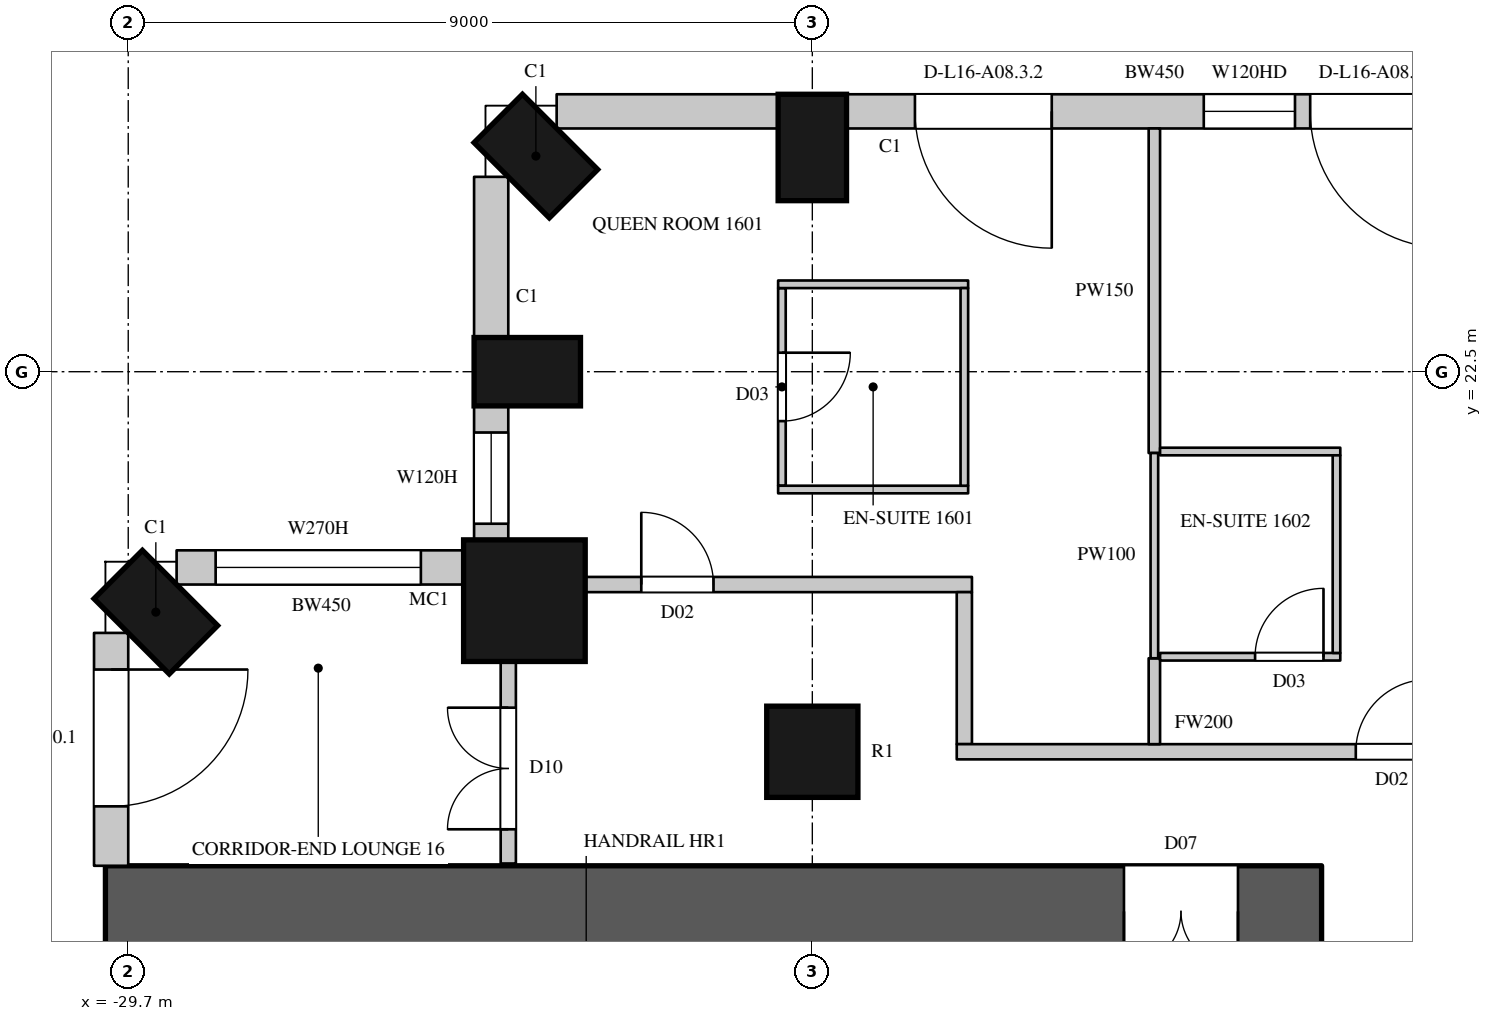
"""IFC4 building model, lengths in metres.
Left out: names, types, materials, properties, quantities, classifications, styles, units other than length and angle.
Written with IfcOpenShell. Run it as: python <this file> out.ifc"""

import sys

from ifc_helpers import new_model, si_unit, direction, frame, frame_2d, origin, origin_2d, place, context, subcontext, project, spatial, rectangle, circle, extrude, element, fill, save


model = new_model("IFC4")
c1 = context("Model", 3, precision=1e-05, world=origin(), true_north=direction((0.0, 1.0)))
c2 = subcontext(c1, "Body", "Model", "MODEL_VIEW")
j1 = project(units=[si_unit("LENGTHUNIT", "METRE"), si_unit("PLANEANGLEUNIT", "RADIAN")], contexts=[c1])
p1 = place(None, origin())
s1 = spatial("IfcSite", under=j1, at=p1, CompositionType="ELEMENT")
p2 = place(p1, origin())
s2 = spatial("IfcBuilding", under=s1, at=p2, CompositionType="ELEMENT")
p3 = place(p2, frame((0.0, 0.0, 87.9)))
s3 = spatial("IfcBuildingStorey", under=s2, at=p3, CompositionType="ELEMENT", Elevation=87.9)
for number, where, z_axis, x_axis in (
    (1, (-29.337, 19.337, 0.0), (0.0, 0.0, 1.0), (-0.707, -0.707, 0.0)),
    (2, (-20.7, 25.45, 0.0), (0.0, 0.0, 1.0), (-1.0, 0.0, 0.0)),
    (3, (-24.337, 25.337, 0.0), (0.0, 0.0, 1.0), (-0.707, -0.707, 0.0)),
    (4, (-24.45, 22.5, 0.0), (0.0, 0.0, 1.0), (0.0, -1.0, 0.0)),
):
    element("IfcColumn", number, at=place(p3, frame(where, z_axis=z_axis, x_axis=x_axis)), inside=s3, PredefinedType="COLUMN", context=c2, shape_type="SweptSolid", body=[
        extrude(rectangle(XDim=0.9, YDim=1.4, at=origin_2d()), origin(), (0.0, 0.0, 1.0), 3.6),
    ])
p4 = place(p3, frame((-24.488, 19.488, 0.0), z_axis=(0.0, 0.0, 1.0), x_axis=(1.0, 0.0, 0.0)))
e5 = element("IfcColumn", 5, at=p4, inside=s3, PredefinedType="COLUMN", context=c2, shape_type="SweptSolid", body=[
    extrude(circle(Radius=0.8, at=origin_2d()), origin(), (0.0, 0.0, 1.0), 3.6),
])
p5 = place(p3, frame((-20.7, 17.5, 0.0), z_axis=(0.0, 0.0, 1.0), x_axis=(1.0, 0.0, 0.0)))
e6 = element("IfcColumn", 6, at=p5, inside=s3, PredefinedType="COLUMN", context=c2, shape_type="SweptSolid", body=[
    extrude(circle(Radius=0.6, at=origin_2d()), origin(), (0.0, 0.0, 1.0), 3.6),
])
p6 = place(p3, frame((-29.925, 19.064, 0.0), z_axis=(0.0, 0.0, 1.0), x_axis=(0.0, -1.0, 0.0)))
e7 = element("IfcWall", 7, at=p6, inside=s3, PredefinedType="SOLIDWALL", context=c2, shape_type="SweptSolid", body=[
    extrude(rectangle(XDim=3.064, YDim=0.45, at=frame_2d((1.532, 0.0))), origin(), (0.0, 0.0, 1.0), 3.3),
])
p7 = place(p6, frame((0.482, 0.0, 0.0)))
e8 = element("IfcOpeningElement", 8, at=p7, cuts=e7, PredefinedType="OPENING", context=c2, shape_type="SweptSolid", body=[
    extrude(rectangle(XDim=1.8, YDim=2.4, at=frame_2d((0.9, 1.2))), frame((0.0, 0.235, 0.0), z_axis=(0.0, -1.0, 0.0), x_axis=(1.0, 0.0, 0.0)), (0.0, 0.0, 1.0), 0.47),
])
p8 = place(p3, frame((-12.15, 25.925, 0.0), z_axis=(0.0, 0.0, 1.0), x_axis=(-1.0, 0.0, 0.0)))
e9 = element("IfcWall", 9, at=p8, inside=s3, PredefinedType="SOLIDWALL", context=c2, shape_type="SweptSolid", body=[
    extrude(rectangle(XDim=8.1, YDim=0.45, at=frame_2d((4.05, 0.0))), origin(), (0.0, 0.0, 1.0), 3.3),
])
p9 = place(p8, frame((0.2, 0.0, 0.0)))
e10 = element("IfcOpeningElement", 10, at=p9, cuts=e9, PredefinedType="OPENING", context=c2, shape_type="SweptSolid", body=[
    extrude(rectangle(XDim=1.8, YDim=2.4, at=frame_2d((0.9, 1.2))), frame((0.0, 0.235, 0.0), z_axis=(0.0, -1.0, 0.0), x_axis=(1.0, 0.0, 0.0)), (0.0, 0.0, 1.0), 0.47),
])
p10 = place(p8, frame((2.2, 0.0, 1.05)))
e11 = element("IfcOpeningElement", 11, at=p10, cuts=e9, PredefinedType="OPENING", context=c2, shape_type="SweptSolid", body=[
    extrude(rectangle(XDim=1.2, YDim=2.0, at=frame_2d((0.6, 1.0))), frame((0.0, 0.235, 0.0), z_axis=(0.0, -1.0, 0.0), x_axis=(1.0, 0.0, 0.0)), (0.0, 0.0, 1.0), 0.47),
])
p11 = place(p8, frame((5.4, 0.0, 0.0)))
e12 = element("IfcOpeningElement", 12, at=p11, cuts=e9, PredefinedType="OPENING", context=c2, shape_type="SweptSolid", body=[
    extrude(rectangle(XDim=1.8, YDim=2.4, at=frame_2d((0.9, 1.2))), frame((0.0, 0.235, 0.0), z_axis=(0.0, -1.0, 0.0), x_axis=(1.0, 0.0, 0.0)), (0.0, 0.0, 1.0), 0.47),
])
p12 = place(p3, frame((-21.15, 25.925, 0.0), z_axis=(0.0, 0.0, 1.0), x_axis=(-1.0, 0.0, 0.0)))
e13 = element("IfcWall", 13, at=p12, inside=s3, PredefinedType="SOLIDWALL", context=c2, shape_type="SweptSolid", body=[
    extrude(rectangle(XDim=2.914, YDim=0.45, at=frame_2d((1.457, 0.0))), origin(), (0.0, 0.0, 1.0), 3.3),
])
p13 = place(p3, frame((-24.925, 25.064, 0.0), z_axis=(0.0, 0.0, 1.0), x_axis=(0.0, -1.0, 0.0)))
e14 = element("IfcWall", 14, at=p13, inside=s3, PredefinedType="SOLIDWALL", context=c2, shape_type="SweptSolid", body=[
    extrude(rectangle(XDim=2.114, YDim=0.45, at=frame_2d((1.057, 0.0))), origin(), (0.0, 0.0, 1.0), 3.3),
])
p14 = place(p3, frame((-24.925, 22.05, 0.0), z_axis=(0.0, 0.0, 1.0), x_axis=(0.0, -1.0, 0.0)))
e15 = element("IfcWall", 15, at=p14, inside=s3, PredefinedType="SOLIDWALL", context=c2, shape_type="SweptSolid", body=[
    extrude(rectangle(XDim=1.792, YDim=0.45, at=frame_2d((0.896, 0.0))), origin(), (0.0, 0.0, 1.0), 3.3),
])
p15 = place(p14, frame((0.35, 0.0, 1.05)))
e16 = element("IfcOpeningElement", 16, at=p15, cuts=e15, PredefinedType="OPENING", context=c2, shape_type="SweptSolid", body=[
    extrude(rectangle(XDim=1.2, YDim=2.0, at=frame_2d((0.6, 1.0))), frame((0.0, 0.235, 0.0), z_axis=(0.0, -1.0, 0.0), x_axis=(1.0, 0.0, 0.0)), (0.0, 0.0, 1.0), 0.47),
])
p16 = place(p3, frame((-25.259, 19.925, 0.0), z_axis=(0.0, 0.0, 1.0), x_axis=(-1.0, 0.0, 0.0)))
e17 = element("IfcWall", 17, at=p16, inside=s3, PredefinedType="SOLIDWALL", context=c2, shape_type="SweptSolid", body=[
    extrude(rectangle(XDim=3.805, YDim=0.45, at=frame_2d((1.903, 0.0))), origin(), (0.0, 0.0, 1.0), 3.3),
])
p17 = place(p16, frame((0.592, 0.0, 1.05)))
e18 = element("IfcOpeningElement", 18, at=p17, cuts=e17, PredefinedType="OPENING", context=c2, shape_type="SweptSolid", body=[
    extrude(rectangle(XDim=2.7, YDim=2.0, at=frame_2d((1.35, 1.0))), frame((0.0, 0.235, 0.0), z_axis=(0.0, -1.0, 0.0), x_axis=(1.0, 0.0, 0.0)), (0.0, 0.0, 1.0), 0.47),
])
p18 = place(p3, frame((-30.0, 15.4, 0.0), z_axis=(0.0, 0.0, 1.0), x_axis=(1.0, 0.0, 0.0)))
e19 = element("IfcWall", 19, at=p18, inside=s3, PredefinedType="SHEAR", context=c2, shape_type="SweptSolid", body=[
    extrude(rectangle(XDim=16.0, YDim=1.2, at=frame_2d((8.0, 0.0))), origin(), (0.0, 0.0, 1.0), 3.6),
])
p19 = place(p18, frame((13.4, 0.0, 0.0)))
e20 = element("IfcOpeningElement", 20, at=p19, cuts=e19, PredefinedType="OPENING", context=c2, shape_type="SweptSolid", body=[
    extrude(rectangle(XDim=1.5, YDim=2.4, at=frame_2d((0.75, 1.2))), frame((0.0, 0.61, 0.0), z_axis=(0.0, -1.0, 0.0), x_axis=(1.0, 0.0, 0.0)), (0.0, 0.0, 1.0), 1.22),
])
p20 = place(p3, frame((-24.7, 16.03, 0.0), z_axis=(0.0, 0.0, 1.0), x_axis=(0.0, 1.0, 0.0)))
e21 = element("IfcWall", 21, at=p20, inside=s3, PredefinedType="PARTITIONING", context=c2, shape_type="SweptSolid", body=[
    extrude(rectangle(XDim=2.67, YDim=0.2, at=frame_2d((1.335, 0.0))), origin(), (0.0, 0.0, 1.0), 3.3),
])
p21 = place(p20, frame((0.45, 0.0, 0.0)))
e22 = element("IfcOpeningElement", 22, at=p21, cuts=e21, PredefinedType="OPENING", context=c2, shape_type="SweptSolid", body=[
    extrude(rectangle(XDim=1.6, YDim=2.4, at=frame_2d((0.8, 1.2))), frame((0.0, 0.11, 0.0), z_axis=(0.0, -1.0, 0.0), x_axis=(1.0, 0.0, 0.0)), (0.0, 0.0, 1.0), 0.22),
])
p22 = place(p3, frame((-23.7, 19.7, 0.0), z_axis=(0.0, 0.0, 1.0), x_axis=(1.0, 0.0, 0.0)))
e23 = element("IfcWall", 23, at=p22, inside=s3, PredefinedType="PARTITIONING", context=c2, shape_type="SweptSolid", body=[
    extrude(rectangle(XDim=5.1, YDim=0.2, at=frame_2d((2.55, 0.0))), origin(), (0.0, 0.0, 1.0), 3.3),
])
p23 = place(p22, frame((0.75, 0.0, 0.0)))
e24 = element("IfcOpeningElement", 24, at=p23, cuts=e23, PredefinedType="OPENING", context=c2, shape_type="SweptSolid", body=[
    extrude(rectangle(XDim=0.95, YDim=2.2, at=frame_2d((0.475, 1.1))), frame((0.0, 0.11, 0.0), z_axis=(0.0, -1.0, 0.0), x_axis=(1.0, 0.0, 0.0)), (0.0, 0.0, 1.0), 0.22),
])
p24 = place(p3, frame((-18.7, 17.6, 0.0), z_axis=(0.0, 0.0, 1.0), x_axis=(0.0, 1.0, 0.0)))
e25 = element("IfcWall", 25, at=p24, inside=s3, PredefinedType="PARTITIONING", context=c2, shape_type="SweptSolid", body=[
    extrude(rectangle(XDim=2.0, YDim=0.2, at=frame_2d((1.0, 0.0))), origin(), (0.0, 0.0, 1.0), 3.3),
])
p25 = place(p3, frame((-18.8, 17.5, 0.0), z_axis=(0.0, 0.0, 1.0), x_axis=(1.0, 0.0, 0.0)))
e26 = element("IfcWall", 26, at=p25, inside=s3, PredefinedType="PARTITIONING", context=c2, shape_type="SweptSolid", body=[
    extrude(rectangle(XDim=6.5, YDim=0.2, at=frame_2d((3.25, 0.0))), origin(), (0.0, 0.0, 1.0), 2.75),
])
p26 = place(p25, frame((5.25, 0.0, 0.0)))
e27 = element("IfcOpeningElement", 27, at=p26, cuts=e26, PredefinedType="OPENING", context=c2, shape_type="SweptSolid", body=[
    extrude(rectangle(XDim=0.95, YDim=2.2, at=frame_2d((0.475, 1.1))), frame((0.0, 0.11, 0.0), z_axis=(0.0, -1.0, 0.0), x_axis=(1.0, 0.0, 0.0)), (0.0, 0.0, 1.0), 0.22),
])
p27 = place(p3, frame((-16.2, 17.6, 0.0), z_axis=(0.0, 0.0, 1.0), x_axis=(0.0, 1.0, 0.0)))
e28 = element("IfcWall", 28, at=p27, inside=s3, PredefinedType="PARTITIONING", context=c2, shape_type="SweptSolid", body=[
    extrude(rectangle(XDim=1.13, YDim=0.15, at=frame_2d((0.565, 0.0))), origin(), (0.0, 0.0, 1.0), 2.65),
])
p28 = place(p3, frame((-16.2, 21.43, 0.0), z_axis=(0.0, 0.0, 1.0), x_axis=(0.0, 1.0, 0.0)))
e29 = element("IfcWall", 29, at=p28, inside=s3, PredefinedType="PARTITIONING", context=c2, shape_type="SweptSolid", body=[
    extrude(rectangle(XDim=4.27, YDim=0.15, at=frame_2d((2.135, 0.0))), origin(), (0.0, 0.0, 1.0), 2.65),
])
p29 = place(p3, frame((-21.1, 21.0, 0.0), z_axis=(0.0, 0.0, 1.0), x_axis=(0.0, 1.0, 0.0)))
e30 = element("IfcWall", 30, at=p29, inside=s3, PredefinedType="PARTITIONING", context=c2, shape_type="SweptSolid", body=[
    extrude(rectangle(XDim=2.6, YDim=0.1, at=frame_2d((1.3, 0.0))), origin(), (0.0, 0.0, 1.0), 3.3),
])
p30 = place(p29, frame((0.85, 0.0, 0.0)))
e31 = element("IfcOpeningElement", 31, at=p30, cuts=e30, PredefinedType="OPENING", context=c2, shape_type="SweptSolid", body=[
    extrude(rectangle(XDim=0.9, YDim=2.2, at=frame_2d((0.45, 1.1))), frame((0.0, 0.06, 0.0), z_axis=(0.0, -1.0, 0.0), x_axis=(1.0, 0.0, 0.0)), (0.0, 0.0, 1.0), 0.12),
])
for number, where, z_axis, x_axis in (
    (32, (-21.15, 20.95, 0.0), (0.0, 0.0, 1.0), (1.0, 0.0, 0.0)),
    (33, (-21.15, 23.65, 0.0), (0.0, 0.0, 1.0), (1.0, 0.0, 0.0)),
):
    element("IfcWall", number, at=place(p3, frame(where, z_axis=z_axis, x_axis=x_axis)), inside=s3, PredefinedType="PARTITIONING", context=c2, shape_type="SweptSolid", body=[
        extrude(rectangle(XDim=2.5, YDim=0.1, at=frame_2d((1.25, 0.0))), origin(), (0.0, 0.0, 1.0), 3.3),
    ])
p31 = place(p3, frame((-18.7, 21.0, 0.0), z_axis=(0.0, 0.0, 1.0), x_axis=(0.0, 1.0, 0.0)))
e34 = element("IfcWall", 34, at=p31, inside=s3, PredefinedType="PARTITIONING", context=c2, shape_type="SweptSolid", body=[
    extrude(rectangle(XDim=2.6, YDim=0.1, at=frame_2d((1.3, 0.0))), origin(), (0.0, 0.0, 1.0), 3.3),
])
p32 = place(p3, frame((-16.2, 18.73, 0.0), z_axis=(0.0, 0.0, 1.0), x_axis=(0.0, 1.0, 0.0)))
e35 = element("IfcWall", 35, at=p32, inside=s3, PredefinedType="PARTITIONING", context=c2, shape_type="SweptSolid", body=[
    extrude(rectangle(XDim=2.7, YDim=0.1, at=frame_2d((1.35, 0.0))), origin(), (0.0, 0.0, 1.0), 2.65),
])
p33 = place(p3, frame((-16.125, 18.75, 0.0), z_axis=(0.0, 0.0, 1.0), x_axis=(1.0, 0.0, 0.0)))
e36 = element("IfcWall", 36, at=p33, inside=s3, PredefinedType="PARTITIONING", context=c2, shape_type="SweptSolid", body=[
    extrude(rectangle(XDim=2.371, YDim=0.1, at=frame_2d((1.186, 0.0))), origin(), (0.0, 0.0, 1.0), 3.3),
])
p34 = place(p33, frame((1.25, 0.0, 0.0)))
e37 = element("IfcOpeningElement", 37, at=p34, cuts=e36, PredefinedType="OPENING", context=c2, shape_type="SweptSolid", body=[
    extrude(rectangle(XDim=0.9, YDim=2.2, at=frame_2d((0.45, 1.1))), frame((0.0, 0.06, 0.0), z_axis=(0.0, -1.0, 0.0), x_axis=(1.0, 0.0, 0.0)), (0.0, 0.0, 1.0), 0.12),
])
p35 = place(p3, frame((-16.125, 21.45, 0.0), z_axis=(0.0, 0.0, 1.0), x_axis=(1.0, 0.0, 0.0)))
e38 = element("IfcWall", 38, at=p35, inside=s3, PredefinedType="PARTITIONING", context=c2, shape_type="SweptSolid", body=[
    extrude(rectangle(XDim=2.371, YDim=0.1, at=frame_2d((1.186, 0.0))), origin(), (0.0, 0.0, 1.0), 3.3),
])
p36 = place(p3, frame((-13.804, 18.8, 0.0), z_axis=(0.0, 0.0, 1.0), x_axis=(0.0, 1.0, 0.0)))
e39 = element("IfcWall", 39, at=p36, inside=s3, PredefinedType="PARTITIONING", context=c2, shape_type="SweptSolid", body=[
    extrude(rectangle(XDim=2.6, YDim=0.1, at=frame_2d((1.3, 0.0))), origin(), (0.0, 0.0, 1.0), 3.3),
])
p37 = place(p7, origin())
e40 = element("IfcDoor", 40, at=p37, inside=s3, OperationType="SLIDING_TO_LEFT", PredefinedType="DOOR", context=c2, shape_type="SweptSolid", body=[
    extrude(rectangle(XDim=1.8, YDim=2.4, at=frame_2d((0.9, 1.2))), frame((0.0, 0.13, 0.0), z_axis=(0.0, -1.0, 0.0), x_axis=(1.0, 0.0, 0.0)), (0.0, 0.0, 1.0), 0.05),
])
fill(e8, e40)
p38 = place(p9, origin())
e41 = element("IfcDoor", 41, at=p38, inside=s3, OperationType="SLIDING_TO_LEFT", PredefinedType="DOOR", context=c2, shape_type="SweptSolid", body=[
    extrude(rectangle(XDim=1.8, YDim=2.4, at=frame_2d((0.9, 1.2))), frame((0.0, 0.13, 0.0), z_axis=(0.0, -1.0, 0.0), x_axis=(1.0, 0.0, 0.0)), (0.0, 0.0, 1.0), 0.05),
])
fill(e10, e41)
p39 = place(p10, origin())
e42 = element("IfcWindow", 42, at=p39, inside=s3, PartitioningType="SINGLE_PANEL", PredefinedType="WINDOW", context=c2, shape_type="SweptSolid", body=[
    extrude(rectangle(XDim=1.2, YDim=2.0, at=frame_2d((0.6, 1.0))), frame((0.0, 0.135, 0.0), z_axis=(0.0, -1.0, 0.0), x_axis=(1.0, 0.0, 0.0)), (0.0, 0.0, 1.0), 0.06),
])
fill(e11, e42)
p40 = place(p11, origin())
e43 = element("IfcDoor", 43, at=p40, inside=s3, OperationType="SLIDING_TO_LEFT", PredefinedType="DOOR", context=c2, shape_type="SweptSolid", body=[
    extrude(rectangle(XDim=1.8, YDim=2.4, at=frame_2d((0.9, 1.2))), frame((0.0, 0.13, 0.0), z_axis=(0.0, -1.0, 0.0), x_axis=(1.0, 0.0, 0.0)), (0.0, 0.0, 1.0), 0.05),
])
fill(e12, e43)
p41 = place(p15, origin())
e44 = element("IfcWindow", 44, at=p41, inside=s3, PartitioningType="SINGLE_PANEL", PredefinedType="WINDOW", context=c2, shape_type="SweptSolid", body=[
    extrude(rectangle(XDim=1.2, YDim=2.0, at=frame_2d((0.6, 1.0))), frame((0.0, 0.135, 0.0), z_axis=(0.0, -1.0, 0.0), x_axis=(1.0, 0.0, 0.0)), (0.0, 0.0, 1.0), 0.06),
])
fill(e16, e44)
p42 = place(p17, origin())
e45 = element("IfcWindow", 45, at=p42, inside=s3, PartitioningType="SINGLE_PANEL", PredefinedType="WINDOW", context=c2, shape_type="SweptSolid", body=[
    extrude(rectangle(XDim=2.7, YDim=2.0, at=frame_2d((1.35, 1.0))), frame((0.0, 0.135, 0.0), z_axis=(0.0, -1.0, 0.0), x_axis=(1.0, 0.0, 0.0)), (0.0, 0.0, 1.0), 0.06),
])
fill(e18, e45)
p43 = place(p21, origin())
e46 = element("IfcDoor", 46, at=p43, inside=s3, OperationType="DOUBLE_DOOR_SINGLE_SWING", PredefinedType="DOOR", context=c2, shape_type="SweptSolid", body=[
    extrude(rectangle(XDim=1.6, YDim=2.4, at=frame_2d((0.8, 1.2))), frame((0.0, 0.025, 0.0), z_axis=(0.0, -1.0, 0.0), x_axis=(1.0, 0.0, 0.0)), (0.0, 0.0, 1.0), 0.05),
])
fill(e22, e46)
p44 = place(p23, origin())
e47 = element("IfcDoor", 47, at=p44, inside=s3, OperationType="SINGLE_SWING_LEFT", PredefinedType="DOOR", context=c2, shape_type="SweptSolid", body=[
    extrude(rectangle(XDim=0.95, YDim=2.2, at=frame_2d((0.475, 1.1))), frame((0.0, 0.025, 0.0), z_axis=(0.0, -1.0, 0.0), x_axis=(1.0, 0.0, 0.0)), (0.0, 0.0, 1.0), 0.05),
])
fill(e24, e47)
p45 = place(p30, origin())
e48 = element("IfcDoor", 48, at=p45, inside=s3, OperationType="SINGLE_SWING_LEFT", PredefinedType="DOOR", context=c2, shape_type="SweptSolid", body=[
    extrude(rectangle(XDim=0.9, YDim=2.2, at=frame_2d((0.45, 1.1))), frame((0.0, 0.025, 0.0), z_axis=(0.0, -1.0, 0.0), x_axis=(1.0, 0.0, 0.0)), (0.0, 0.0, 1.0), 0.05),
])
fill(e31, e48)
p46 = place(p26, origin())
e49 = element("IfcDoor", 49, at=p46, inside=s3, OperationType="SINGLE_SWING_RIGHT", PredefinedType="DOOR", context=c2, shape_type="SweptSolid", body=[
    extrude(rectangle(XDim=0.95, YDim=2.2, at=frame_2d((0.475, 1.1))), frame((0.0, 0.025, 0.0), z_axis=(0.0, -1.0, 0.0), x_axis=(1.0, 0.0, 0.0)), (0.0, 0.0, 1.0), 0.05),
])
fill(e27, e49)
p47 = place(p34, origin())
e50 = element("IfcDoor", 50, at=p47, inside=s3, OperationType="SINGLE_SWING_RIGHT", PredefinedType="DOOR", context=c2, shape_type="SweptSolid", body=[
    extrude(rectangle(XDim=0.9, YDim=2.2, at=frame_2d((0.45, 1.1))), frame((0.0, 0.025, 0.0), z_axis=(0.0, -1.0, 0.0), x_axis=(1.0, 0.0, 0.0)), (0.0, 0.0, 1.0), 0.05),
])
fill(e37, e50)
p48 = place(p19, origin())
e51 = element("IfcDoor", 51, at=p48, inside=s3, OperationType="DOUBLE_DOOR_SINGLE_SWING", PredefinedType="DOOR", context=c2, shape_type="SweptSolid", body=[
    extrude(rectangle(XDim=1.5, YDim=2.4, at=frame_2d((0.75, 1.2))), frame((0.0, 0.025, 0.0), z_axis=(0.0, -1.0, 0.0), x_axis=(1.0, 0.0, 0.0)), (0.0, 0.0, 1.0), 0.05),
])
fill(e20, e51)
save(model, sys.argv[1])
